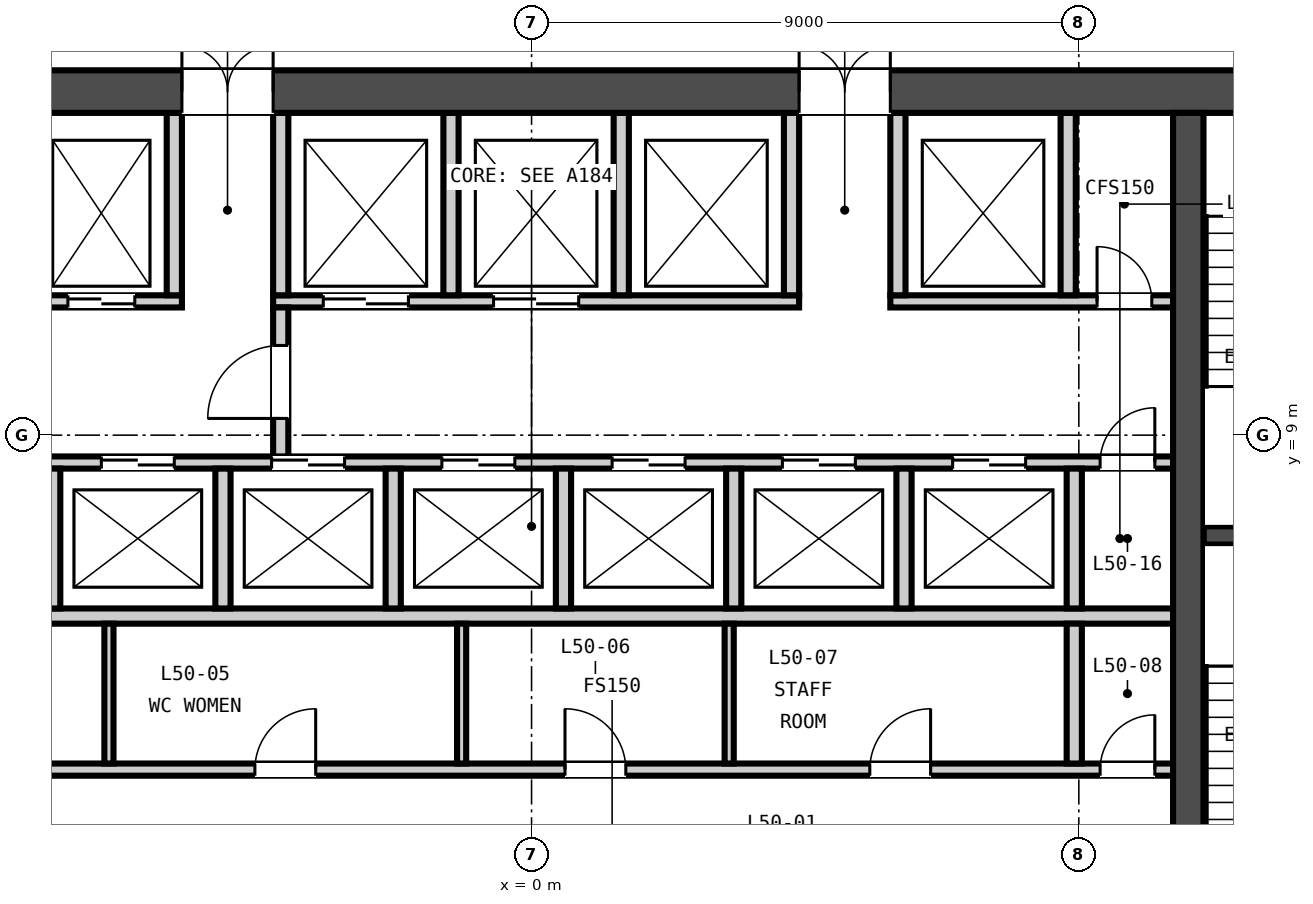
"""IFC4 building model, lengths in metres.
Left out: names, types, materials, properties, quantities, classifications, styles, units other than length and angle.
Written with IfcOpenShell. Run it as: python <this file> out.ifc"""

import sys

from ifc_helpers import new_model, si_unit, direction, frame, frame_2d, origin, place, context, subcontext, project, spatial, rectangle, extrude, element, fill, save


model = new_model("IFC4")
c1 = context("Model", 3, precision=1e-05, world=origin(), true_north=direction((0.0, 1.0)))
c2 = subcontext(c1, "Body", "Model", "MODEL_VIEW")
j1 = project(units=[si_unit("LENGTHUNIT", "METRE"), si_unit("PLANEANGLEUNIT", "RADIAN")], contexts=[c1])
p1 = place(None, origin())
s1 = spatial("IfcSite", under=j1, at=p1, CompositionType="ELEMENT")
p2 = place(p1, origin())
s2 = spatial("IfcBuilding", under=s1, at=p2, CompositionType="ELEMENT")
p3 = place(p2, frame((0.0, 0.0, 200.0)))
s3 = spatial("IfcBuildingStorey", under=s2, at=p3, CompositionType="ELEMENT", Elevation=200.0)
p4 = place(p3, frame((-15.0, 14.65, -0.15), z_axis=(0.0, 0.0, 1.0), x_axis=(1.0, 0.0, 0.0)))
e1 = element("IfcWall", 1, at=p4, inside=s3, PredefinedType="SOLIDWALL", context=c2, shape_type="SweptSolid", body=[
    extrude(rectangle(XDim=30.0, YDim=0.7, at=frame_2d((15.0, 0.0))), origin(), (0.0, 0.0, 1.0), 3.65),
])
p5 = place(p4, frame((9.25, 0.0, 0.15)))
e2 = element("IfcOpeningElement", 2, at=p5, cuts=e1, PredefinedType="OPENING", context=c2, shape_type="SweptSolid", body=[
    extrude(rectangle(XDim=1.5, YDim=2.1, at=frame_2d((0.75, 1.05))), frame((0.0, 0.36, 0.0), z_axis=(0.0, -1.0, 0.0), x_axis=(1.0, 0.0, 0.0)), (0.0, 0.0, 1.0), 0.72),
])
p6 = place(p4, frame((19.4, 0.0, 0.15)))
e3 = element("IfcOpeningElement", 3, at=p6, cuts=e1, PredefinedType="OPENING", context=c2, shape_type="SweptSolid", body=[
    extrude(rectangle(XDim=1.5, YDim=2.1, at=frame_2d((0.75, 1.05))), frame((0.0, 0.36, 0.0), z_axis=(0.0, -1.0, 0.0), x_axis=(1.0, 0.0, 0.0)), (0.0, 0.0, 1.0), 0.72),
])
p7 = place(p4, frame((1.5, 0.0, 0.15)))
e4 = element("IfcOpeningElement", 4, at=p7, cuts=e1, PredefinedType="OPENING", context=c2, shape_type="SweptSolid", body=[
    extrude(rectangle(XDim=1.2, YDim=2.1, at=frame_2d((0.6, 1.05))), frame((0.0, 0.36, 0.0), z_axis=(0.0, -1.0, 0.0), x_axis=(1.0, 0.0, 0.0)), (0.0, 0.0, 1.0), 0.72),
])
p8 = place(p4, frame((27.3, 0.0, 0.15)))
e5 = element("IfcOpeningElement", 5, at=p8, cuts=e1, PredefinedType="OPENING", context=c2, shape_type="SweptSolid", body=[
    extrude(rectangle(XDim=1.2, YDim=2.1, at=frame_2d((0.6, 1.05))), frame((0.0, 0.36, 0.0), z_axis=(0.0, -1.0, 0.0), x_axis=(1.0, 0.0, 0.0)), (0.0, 0.0, 1.0), 0.72),
])
p9 = place(p3, frame((10.8, 0.7, -0.15), z_axis=(0.0, 0.0, 1.0), x_axis=(0.0, 1.0, 0.0)))
e6 = element("IfcWall", 6, at=p9, inside=s3, PredefinedType="SOLIDWALL", context=c2, shape_type="SweptSolid", body=[
    extrude(rectangle(XDim=13.6, YDim=0.5, at=frame_2d((6.8, 0.0))), origin(), (0.0, 0.0, 1.0), 3.65),
])
p10 = place(p3, frame((-10.55, 3.5, 0.0), z_axis=(0.0, 0.0, 1.0), x_axis=(1.0, 0.0, 0.0)))
e7 = element("IfcWall", 7, at=p10, inside=s3, PredefinedType="PARTITIONING", context=c2, shape_type="SweptSolid", body=[
    extrude(rectangle(XDim=21.1, YDim=0.2, at=frame_2d((10.55, 0.0))), origin(), (0.0, 0.0, 1.0), 3.5),
])
p11 = place(p10, frame((1.262, 0.0, 0.0)))
e8 = element("IfcOpeningElement", 8, at=p11, cuts=e7, PredefinedType="OPENING", context=c2, shape_type="SweptSolid", body=[
    extrude(rectangle(XDim=1.0, YDim=2.1, at=frame_2d((0.5, 1.05))), frame((0.0, 0.11, 0.0), z_axis=(0.0, -1.0, 0.0), x_axis=(1.0, 0.0, 0.0)), (0.0, 0.0, 1.0), 0.22),
])
p12 = place(p10, frame((6.0, 0.0, 0.0)))
e9 = element("IfcOpeningElement", 9, at=p12, cuts=e7, PredefinedType="OPENING", context=c2, shape_type="SweptSolid", body=[
    extrude(rectangle(XDim=1.0, YDim=2.1, at=frame_2d((0.5, 1.05))), frame((0.0, 0.11, 0.0), z_axis=(0.0, -1.0, 0.0), x_axis=(1.0, 0.0, 0.0)), (0.0, 0.0, 1.0), 0.22),
])
p13 = place(p10, frame((11.1, 0.0, 0.0)))
e10 = element("IfcOpeningElement", 10, at=p13, cuts=e7, PredefinedType="OPENING", context=c2, shape_type="SweptSolid", body=[
    extrude(rectangle(XDim=1.0, YDim=2.1, at=frame_2d((0.5, 1.05))), frame((0.0, 0.11, 0.0), z_axis=(0.0, -1.0, 0.0), x_axis=(1.0, 0.0, 0.0)), (0.0, 0.0, 1.0), 0.22),
])
p14 = place(p10, frame((16.113, 0.0, 0.0)))
e11 = element("IfcOpeningElement", 11, at=p14, cuts=e7, PredefinedType="OPENING", context=c2, shape_type="SweptSolid", body=[
    extrude(rectangle(XDim=1.0, YDim=2.1, at=frame_2d((0.5, 1.05))), frame((0.0, 0.11, 0.0), z_axis=(0.0, -1.0, 0.0), x_axis=(1.0, 0.0, 0.0)), (0.0, 0.0, 1.0), 0.22),
])
p15 = place(p10, frame((19.9, 0.0, 0.0)))
e12 = element("IfcOpeningElement", 12, at=p15, cuts=e7, PredefinedType="OPENING", context=c2, shape_type="SweptSolid", body=[
    extrude(rectangle(XDim=0.9, YDim=2.1, at=frame_2d((0.45, 1.05))), frame((0.0, 0.11, 0.0), z_axis=(0.0, -1.0, 0.0), x_axis=(1.0, 0.0, 0.0)), (0.0, 0.0, 1.0), 0.22),
])
p16 = place(p3, frame((-10.55, 6.025, 0.0), z_axis=(0.0, 0.0, 1.0), x_axis=(1.0, 0.0, 0.0)))
e13 = element("IfcWall", 13, at=p16, inside=s3, PredefinedType="PARTITIONING", context=c2, shape_type="SweptSolid", body=[
    extrude(rectangle(XDim=21.1, YDim=0.25, at=frame_2d((10.55, 0.0))), origin(), (0.0, 0.0, 1.0), 3.5),
])
p17 = place(p3, frame((-10.55, 8.55, 0.0), z_axis=(0.0, 0.0, 1.0), x_axis=(1.0, 0.0, 0.0)))
e14 = element("IfcWall", 14, at=p17, inside=s3, PredefinedType="PARTITIONING", context=c2, shape_type="SweptSolid", body=[
    extrude(rectangle(XDim=21.1, YDim=0.2, at=frame_2d((10.55, 0.0))), origin(), (0.0, 0.0, 1.0), 3.5),
])
p18 = place(p17, frame((0.675, 0.0, 0.0)))
e15 = element("IfcOpeningElement", 15, at=p18, cuts=e14, PredefinedType="OPENING", context=c2, shape_type="SweptSolid", body=[
    extrude(rectangle(XDim=1.2, YDim=2.1, at=frame_2d((0.6, 1.05))), frame((0.0, 0.11, 0.0), z_axis=(0.0, -1.0, 0.0), x_axis=(1.0, 0.0, 0.0)), (0.0, 0.0, 1.0), 0.22),
])
p19 = place(p17, frame((3.475, 0.0, 0.0)))
e16 = element("IfcOpeningElement", 16, at=p19, cuts=e14, PredefinedType="OPENING", context=c2, shape_type="SweptSolid", body=[
    extrude(rectangle(XDim=1.2, YDim=2.1, at=frame_2d((0.6, 1.05))), frame((0.0, 0.11, 0.0), z_axis=(0.0, -1.0, 0.0), x_axis=(1.0, 0.0, 0.0)), (0.0, 0.0, 1.0), 0.22),
])
p20 = place(p17, frame((6.275, 0.0, 0.0)))
e17 = element("IfcOpeningElement", 17, at=p20, cuts=e14, PredefinedType="OPENING", context=c2, shape_type="SweptSolid", body=[
    extrude(rectangle(XDim=1.2, YDim=2.1, at=frame_2d((0.6, 1.05))), frame((0.0, 0.11, 0.0), z_axis=(0.0, -1.0, 0.0), x_axis=(1.0, 0.0, 0.0)), (0.0, 0.0, 1.0), 0.22),
])
p21 = place(p17, frame((9.075, 0.0, 0.0)))
e18 = element("IfcOpeningElement", 18, at=p21, cuts=e14, PredefinedType="OPENING", context=c2, shape_type="SweptSolid", body=[
    extrude(rectangle(XDim=1.2, YDim=2.1, at=frame_2d((0.6, 1.05))), frame((0.0, 0.11, 0.0), z_axis=(0.0, -1.0, 0.0), x_axis=(1.0, 0.0, 0.0)), (0.0, 0.0, 1.0), 0.22),
])
p22 = place(p17, frame((11.875, 0.0, 0.0)))
e19 = element("IfcOpeningElement", 19, at=p22, cuts=e14, PredefinedType="OPENING", context=c2, shape_type="SweptSolid", body=[
    extrude(rectangle(XDim=1.2, YDim=2.1, at=frame_2d((0.6, 1.05))), frame((0.0, 0.11, 0.0), z_axis=(0.0, -1.0, 0.0), x_axis=(1.0, 0.0, 0.0)), (0.0, 0.0, 1.0), 0.22),
])
p23 = place(p17, frame((14.675, 0.0, 0.0)))
e20 = element("IfcOpeningElement", 20, at=p23, cuts=e14, PredefinedType="OPENING", context=c2, shape_type="SweptSolid", body=[
    extrude(rectangle(XDim=1.2, YDim=2.1, at=frame_2d((0.6, 1.05))), frame((0.0, 0.11, 0.0), z_axis=(0.0, -1.0, 0.0), x_axis=(1.0, 0.0, 0.0)), (0.0, 0.0, 1.0), 0.22),
])
p24 = place(p17, frame((17.475, 0.0, 0.0)))
e21 = element("IfcOpeningElement", 21, at=p24, cuts=e14, PredefinedType="OPENING", context=c2, shape_type="SweptSolid", body=[
    extrude(rectangle(XDim=1.2, YDim=2.1, at=frame_2d((0.6, 1.05))), frame((0.0, 0.11, 0.0), z_axis=(0.0, -1.0, 0.0), x_axis=(1.0, 0.0, 0.0)), (0.0, 0.0, 1.0), 0.22),
])
p25 = place(p17, frame((19.9, 0.0, 0.0)))
e22 = element("IfcOpeningElement", 22, at=p25, cuts=e14, PredefinedType="OPENING", context=c2, shape_type="SweptSolid", body=[
    extrude(rectangle(XDim=0.9, YDim=2.1, at=frame_2d((0.45, 1.05))), frame((0.0, 0.11, 0.0), z_axis=(0.0, -1.0, 0.0), x_axis=(1.0, 0.0, 0.0)), (0.0, 0.0, 1.0), 0.22),
])
p26 = place(p3, frame((-10.55, 11.2, 0.0), z_axis=(0.0, 0.0, 1.0), x_axis=(1.0, 0.0, 0.0)))
e23 = element("IfcWall", 23, at=p26, inside=s3, PredefinedType="PARTITIONING", context=c2, shape_type="SweptSolid", body=[
    extrude(rectangle(XDim=4.8, YDim=0.2, at=frame_2d((2.4, 0.0))), origin(), (0.0, 0.0, 1.0), 3.5),
])
p27 = place(p26, frame((0.525, 0.0, 0.0)))
e24 = element("IfcOpeningElement", 24, at=p27, cuts=e23, PredefinedType="OPENING", context=c2, shape_type="SweptSolid", body=[
    extrude(rectangle(XDim=1.1, YDim=2.1, at=frame_2d((0.55, 1.05))), frame((0.0, 0.11, 0.0), z_axis=(0.0, -1.0, 0.0), x_axis=(1.0, 0.0, 0.0)), (0.0, 0.0, 1.0), 0.22),
])
p28 = place(p26, frame((2.925, 0.0, 0.0)))
e25 = element("IfcOpeningElement", 25, at=p28, cuts=e23, PredefinedType="OPENING", context=c2, shape_type="SweptSolid", body=[
    extrude(rectangle(XDim=1.1, YDim=2.1, at=frame_2d((0.55, 1.05))), frame((0.0, 0.11, 0.0), z_axis=(0.0, -1.0, 0.0), x_axis=(1.0, 0.0, 0.0)), (0.0, 0.0, 1.0), 0.22),
])
p29 = place(p3, frame((-4.25, 11.2, 0.0), z_axis=(0.0, 0.0, 1.0), x_axis=(1.0, 0.0, 0.0)))
e26 = element("IfcWall", 26, at=p29, inside=s3, PredefinedType="PARTITIONING", context=c2, shape_type="SweptSolid", body=[
    extrude(rectangle(XDim=8.65, YDim=0.2, at=frame_2d((4.325, 0.0))), origin(), (0.0, 0.0, 1.0), 3.5),
])
p30 = place(p29, frame((0.825, 0.0, 0.0)))
e27 = element("IfcOpeningElement", 27, at=p30, cuts=e26, PredefinedType="OPENING", context=c2, shape_type="SweptSolid", body=[
    extrude(rectangle(XDim=1.4, YDim=2.1, at=frame_2d((0.7, 1.05))), frame((0.0, 0.11, 0.0), z_axis=(0.0, -1.0, 0.0), x_axis=(1.0, 0.0, 0.0)), (0.0, 0.0, 1.0), 0.22),
])
p31 = place(p29, frame((3.625, 0.0, 0.0)))
e28 = element("IfcOpeningElement", 28, at=p31, cuts=e26, PredefinedType="OPENING", context=c2, shape_type="SweptSolid", body=[
    extrude(rectangle(XDim=1.4, YDim=2.1, at=frame_2d((0.7, 1.05))), frame((0.0, 0.11, 0.0), z_axis=(0.0, -1.0, 0.0), x_axis=(1.0, 0.0, 0.0)), (0.0, 0.0, 1.0), 0.22),
])
p32 = place(p3, frame((5.9, 11.2, 0.0), z_axis=(0.0, 0.0, 1.0), x_axis=(1.0, 0.0, 0.0)))
e29 = element("IfcWall", 29, at=p32, inside=s3, PredefinedType="PARTITIONING", context=c2, shape_type="SweptSolid", body=[
    extrude(rectangle(XDim=4.65, YDim=0.2, at=frame_2d((2.325, 0.0))), origin(), (0.0, 0.0, 1.0), 3.5),
])
p33 = place(p32, frame((3.4, 0.0, 0.0)))
e30 = element("IfcOpeningElement", 30, at=p33, cuts=e29, PredefinedType="OPENING", context=c2, shape_type="SweptSolid", body=[
    extrude(rectangle(XDim=0.9, YDim=2.1, at=frame_2d((0.45, 1.05))), frame((0.0, 0.11, 0.0), z_axis=(0.0, -1.0, 0.0), x_axis=(1.0, 0.0, 0.0)), (0.0, 0.0, 1.0), 0.22),
])
p34 = place(p3, frame((-4.125, 8.65, 0.0), z_axis=(0.0, 0.0, 1.0), x_axis=(0.0, 1.0, 0.0)))
e31 = element("IfcWall", 31, at=p34, inside=s3, PredefinedType="PARTITIONING", context=c2, shape_type="SweptSolid", body=[
    extrude(rectangle(XDim=2.45, YDim=0.25, at=frame_2d((1.225, 0.0))), origin(), (0.0, 0.0, 1.0), 3.5),
])
p35 = place(p34, frame((0.625, 0.0, 0.0)))
e32 = element("IfcOpeningElement", 32, at=p35, cuts=e31, PredefinedType="OPENING", context=c2, shape_type="SweptSolid", body=[
    extrude(rectangle(XDim=1.2, YDim=2.1, at=frame_2d((0.6, 1.05))), frame((0.0, 0.135, 0.0), z_axis=(0.0, -1.0, 0.0), x_axis=(1.0, 0.0, 0.0)), (0.0, 0.0, 1.0), 0.27),
])
for number, where, z_axis, x_axis in (
    (33, (-6.95, 3.6, 0.0), (0.0, 0.0, 1.0), (0.0, 1.0, 0.0)),
    (34, (-1.15, 3.6, 0.0), (0.0, 0.0, 1.0), (0.0, 1.0, 0.0)),
    (35, (3.25, 3.6, 0.0), (0.0, 0.0, 1.0), (0.0, 1.0, 0.0)),
):
    element("IfcWall", number, at=place(p3, frame(where, z_axis=z_axis, x_axis=x_axis)), inside=s3, PredefinedType="PARTITIONING", context=c2, shape_type="SweptSolid", body=[
        extrude(rectangle(XDim=2.3, YDim=0.15, at=frame_2d((1.15, 0.0))), origin(), (0.0, 0.0, 1.0), 3.5),
    ])
p36 = place(p3, frame((8.925, 3.6, 0.0), z_axis=(0.0, 0.0, 1.0), x_axis=(0.0, 1.0, 0.0)))
e36 = element("IfcWall", 36, at=p36, inside=s3, PredefinedType="PARTITIONING", context=c2, shape_type="SweptSolid", body=[
    extrude(rectangle(XDim=2.3, YDim=0.25, at=frame_2d((1.15, 0.0))), origin(), (0.0, 0.0, 1.0), 3.5),
])
for number, where, z_axis, x_axis in (
    (37, (-7.875, 6.15, 0.0), (0.0, 0.0, 1.0), (0.0, 1.0, 0.0)),
    (38, (-5.075, 6.15, 0.0), (0.0, 0.0, 1.0), (0.0, 1.0, 0.0)),
    (39, (-2.275, 6.15, 0.0), (0.0, 0.0, 1.0), (0.0, 1.0, 0.0)),
    (40, (0.525, 6.15, 0.0), (0.0, 0.0, 1.0), (0.0, 1.0, 0.0)),
    (41, (3.325, 6.15, 0.0), (0.0, 0.0, 1.0), (0.0, 1.0, 0.0)),
    (42, (6.125, 6.15, 0.0), (0.0, 0.0, 1.0), (0.0, 1.0, 0.0)),
    (43, (8.925, 6.15, 0.0), (0.0, 0.0, 1.0), (0.0, 1.0, 0.0)),
):
    element("IfcWall", number, at=place(p3, frame(where, z_axis=z_axis, x_axis=x_axis)), inside=s3, PredefinedType="PARTITIONING", context=c2, shape_type="SweptSolid", body=[
        extrude(rectangle(XDim=2.3, YDim=0.25, at=frame_2d((1.15, 0.0))), origin(), (0.0, 0.0, 1.0), 3.5),
    ])
for number, where, z_axis, x_axis in (
    (44, (-5.875, 11.3, 0.0), (0.0, 0.0, 1.0), (0.0, 1.0, 0.0)),
    (45, (-4.125, 11.3, 0.0), (0.0, 0.0, 1.0), (0.0, 1.0, 0.0)),
    (46, (-1.325, 11.3, 0.0), (0.0, 0.0, 1.0), (0.0, 1.0, 0.0)),
    (47, (1.475, 11.3, 0.0), (0.0, 0.0, 1.0), (0.0, 1.0, 0.0)),
    (48, (4.275, 11.3, 0.0), (0.0, 0.0, 1.0), (0.0, 1.0, 0.0)),
    (49, (6.025, 11.3, 0.0), (0.0, 0.0, 1.0), (0.0, 1.0, 0.0)),
    (50, (8.825, 11.3, 0.0), (0.0, 0.0, 1.0), (0.0, 1.0, 0.0)),
):
    element("IfcWall", number, at=place(p3, frame(where, z_axis=z_axis, x_axis=x_axis)), inside=s3, PredefinedType="PARTITIONING", context=c2, shape_type="SweptSolid", body=[
        extrude(rectangle(XDim=3.0, YDim=0.25, at=frame_2d((1.5, 0.0))), origin(), (0.0, 0.0, 1.0), 3.5),
    ])
p37 = place(p3, frame((11.05, 7.35, 0.0), z_axis=(0.0, 0.0, 1.0), x_axis=(1.0, 0.0, 0.0)))
e51 = element("IfcWall", 51, at=p37, inside=s3, PredefinedType="SOLIDWALL", context=c2, shape_type="SweptSolid", body=[
    extrude(rectangle(XDim=2.95, YDim=0.3, at=frame_2d((1.475, 0.0))), origin(), (0.0, 0.0, 1.0), 3.5),
])
p38 = place(p35, origin())
e52 = element("IfcDoor", 52, at=p38, inside=s3, OperationType="SINGLE_SWING_LEFT", PredefinedType="DOOR", context=c2, shape_type="SweptSolid", body=[
    extrude(rectangle(XDim=1.2, YDim=2.1, at=frame_2d((0.6, 1.05))), frame((0.0, 0.025, 0.0), z_axis=(0.0, -1.0, 0.0), x_axis=(1.0, 0.0, 0.0)), (0.0, 0.0, 1.0), 0.05),
])
fill(e32, e52)
p39 = place(p12, origin())
e53 = element("IfcDoor", 53, at=p39, inside=s3, OperationType="SINGLE_SWING_RIGHT", PredefinedType="DOOR", context=c2, shape_type="SweptSolid", body=[
    extrude(rectangle(XDim=1.0, YDim=2.1, at=frame_2d((0.5, 1.05))), frame((0.0, 0.025, 0.0), z_axis=(0.0, -1.0, 0.0), x_axis=(1.0, 0.0, 0.0)), (0.0, 0.0, 1.0), 0.05),
])
fill(e9, e53)
p40 = place(p13, origin())
e54 = element("IfcDoor", 54, at=p40, inside=s3, OperationType="SINGLE_SWING_LEFT", PredefinedType="DOOR", context=c2, shape_type="SweptSolid", body=[
    extrude(rectangle(XDim=1.0, YDim=2.1, at=frame_2d((0.5, 1.05))), frame((0.0, 0.025, 0.0), z_axis=(0.0, -1.0, 0.0), x_axis=(1.0, 0.0, 0.0)), (0.0, 0.0, 1.0), 0.05),
])
fill(e10, e54)
p41 = place(p14, origin())
e55 = element("IfcDoor", 55, at=p41, inside=s3, OperationType="SINGLE_SWING_RIGHT", PredefinedType="DOOR", context=c2, shape_type="SweptSolid", body=[
    extrude(rectangle(XDim=1.0, YDim=2.1, at=frame_2d((0.5, 1.05))), frame((0.0, 0.025, 0.0), z_axis=(0.0, -1.0, 0.0), x_axis=(1.0, 0.0, 0.0)), (0.0, 0.0, 1.0), 0.05),
])
fill(e11, e55)
p42 = place(p15, origin())
e56 = element("IfcDoor", 56, at=p42, inside=s3, OperationType="SINGLE_SWING_RIGHT", PredefinedType="DOOR", context=c2, shape_type="SweptSolid", body=[
    extrude(rectangle(XDim=0.9, YDim=2.1, at=frame_2d((0.45, 1.05))), frame((0.0, 0.025, 0.0), z_axis=(0.0, -1.0, 0.0), x_axis=(1.0, 0.0, 0.0)), (0.0, 0.0, 1.0), 0.05),
])
fill(e12, e56)
p43 = place(p19, origin())
e57 = element("IfcDoor", 57, at=p43, inside=s3, OperationType="DOUBLE_DOOR_SLIDING", PredefinedType="DOOR", context=c2, shape_type="SweptSolid", body=[
    extrude(rectangle(XDim=1.2, YDim=2.1, at=frame_2d((0.6, 1.05))), frame((0.0, 0.025, 0.0), z_axis=(0.0, -1.0, 0.0), x_axis=(1.0, 0.0, 0.0)), (0.0, 0.0, 1.0), 0.05),
])
fill(e16, e57)
p44 = place(p20, origin())
e58 = element("IfcDoor", 58, at=p44, inside=s3, OperationType="DOUBLE_DOOR_SLIDING", PredefinedType="DOOR", context=c2, shape_type="SweptSolid", body=[
    extrude(rectangle(XDim=1.2, YDim=2.1, at=frame_2d((0.6, 1.05))), frame((0.0, 0.025, 0.0), z_axis=(0.0, -1.0, 0.0), x_axis=(1.0, 0.0, 0.0)), (0.0, 0.0, 1.0), 0.05),
])
fill(e17, e58)
p45 = place(p21, origin())
e59 = element("IfcDoor", 59, at=p45, inside=s3, OperationType="DOUBLE_DOOR_SLIDING", PredefinedType="DOOR", context=c2, shape_type="SweptSolid", body=[
    extrude(rectangle(XDim=1.2, YDim=2.1, at=frame_2d((0.6, 1.05))), frame((0.0, 0.025, 0.0), z_axis=(0.0, -1.0, 0.0), x_axis=(1.0, 0.0, 0.0)), (0.0, 0.0, 1.0), 0.05),
])
fill(e18, e59)
p46 = place(p22, origin())
e60 = element("IfcDoor", 60, at=p46, inside=s3, OperationType="DOUBLE_DOOR_SLIDING", PredefinedType="DOOR", context=c2, shape_type="SweptSolid", body=[
    extrude(rectangle(XDim=1.2, YDim=2.1, at=frame_2d((0.6, 1.05))), frame((0.0, 0.025, 0.0), z_axis=(0.0, -1.0, 0.0), x_axis=(1.0, 0.0, 0.0)), (0.0, 0.0, 1.0), 0.05),
])
fill(e19, e60)
p47 = place(p23, origin())
e61 = element("IfcDoor", 61, at=p47, inside=s3, OperationType="DOUBLE_DOOR_SLIDING", PredefinedType="DOOR", context=c2, shape_type="SweptSolid", body=[
    extrude(rectangle(XDim=1.2, YDim=2.1, at=frame_2d((0.6, 1.05))), frame((0.0, 0.025, 0.0), z_axis=(0.0, -1.0, 0.0), x_axis=(1.0, 0.0, 0.0)), (0.0, 0.0, 1.0), 0.05),
])
fill(e20, e61)
p48 = place(p24, origin())
e62 = element("IfcDoor", 62, at=p48, inside=s3, OperationType="DOUBLE_DOOR_SLIDING", PredefinedType="DOOR", context=c2, shape_type="SweptSolid", body=[
    extrude(rectangle(XDim=1.2, YDim=2.1, at=frame_2d((0.6, 1.05))), frame((0.0, 0.025, 0.0), z_axis=(0.0, -1.0, 0.0), x_axis=(1.0, 0.0, 0.0)), (0.0, 0.0, 1.0), 0.05),
])
fill(e21, e62)
p49 = place(p25, origin())
e63 = element("IfcDoor", 63, at=p49, inside=s3, OperationType="SINGLE_SWING_RIGHT", PredefinedType="DOOR", context=c2, shape_type="SweptSolid", body=[
    extrude(rectangle(XDim=0.9, YDim=2.1, at=frame_2d((0.45, 1.05))), frame((0.0, 0.025, 0.0), z_axis=(0.0, -1.0, 0.0), x_axis=(1.0, 0.0, 0.0)), (0.0, 0.0, 1.0), 0.05),
])
fill(e22, e63)
p50 = place(p28, origin())
e64 = element("IfcDoor", 64, at=p50, inside=s3, OperationType="DOUBLE_DOOR_SLIDING", PredefinedType="DOOR", context=c2, shape_type="SweptSolid", body=[
    extrude(rectangle(XDim=1.1, YDim=2.1, at=frame_2d((0.55, 1.05))), frame((0.0, 0.025, 0.0), z_axis=(0.0, -1.0, 0.0), x_axis=(1.0, 0.0, 0.0)), (0.0, 0.0, 1.0), 0.05),
])
fill(e25, e64)
p51 = place(p30, origin())
e65 = element("IfcDoor", 65, at=p51, inside=s3, OperationType="DOUBLE_DOOR_SLIDING", PredefinedType="DOOR", context=c2, shape_type="SweptSolid", body=[
    extrude(rectangle(XDim=1.4, YDim=2.1, at=frame_2d((0.7, 1.05))), frame((0.0, 0.025, 0.0), z_axis=(0.0, -1.0, 0.0), x_axis=(1.0, 0.0, 0.0)), (0.0, 0.0, 1.0), 0.05),
])
fill(e27, e65)
p52 = place(p31, origin())
e66 = element("IfcDoor", 66, at=p52, inside=s3, OperationType="DOUBLE_DOOR_SLIDING", PredefinedType="DOOR", context=c2, shape_type="SweptSolid", body=[
    extrude(rectangle(XDim=1.4, YDim=2.1, at=frame_2d((0.7, 1.05))), frame((0.0, 0.025, 0.0), z_axis=(0.0, -1.0, 0.0), x_axis=(1.0, 0.0, 0.0)), (0.0, 0.0, 1.0), 0.05),
])
fill(e28, e66)
p53 = place(p33, origin())
e67 = element("IfcDoor", 67, at=p53, inside=s3, OperationType="SINGLE_SWING_LEFT", PredefinedType="DOOR", context=c2, shape_type="SweptSolid", body=[
    extrude(rectangle(XDim=0.9, YDim=2.1, at=frame_2d((0.45, 1.05))), frame((0.0, 0.025, 0.0), z_axis=(0.0, -1.0, 0.0), x_axis=(1.0, 0.0, 0.0)), (0.0, 0.0, 1.0), 0.05),
])
fill(e30, e67)
p54 = place(p5, origin())
e68 = element("IfcDoor", 68, at=p54, inside=s3, OperationType="DOUBLE_DOOR_SINGLE_SWING", PredefinedType="DOOR", context=c2, shape_type="SweptSolid", body=[
    extrude(rectangle(XDim=1.5, YDim=2.1, at=frame_2d((0.75, 1.05))), frame((0.0, 0.025, 0.0), z_axis=(0.0, -1.0, 0.0), x_axis=(1.0, 0.0, 0.0)), (0.0, 0.0, 1.0), 0.05),
])
fill(e2, e68)
p55 = place(p6, origin())
e69 = element("IfcDoor", 69, at=p55, inside=s3, OperationType="DOUBLE_DOOR_SINGLE_SWING", PredefinedType="DOOR", context=c2, shape_type="SweptSolid", body=[
    extrude(rectangle(XDim=1.5, YDim=2.1, at=frame_2d((0.75, 1.05))), frame((0.0, 0.025, 0.0), z_axis=(0.0, -1.0, 0.0), x_axis=(1.0, 0.0, 0.0)), (0.0, 0.0, 1.0), 0.05),
])
fill(e3, e69)
save(model, sys.argv[1])
